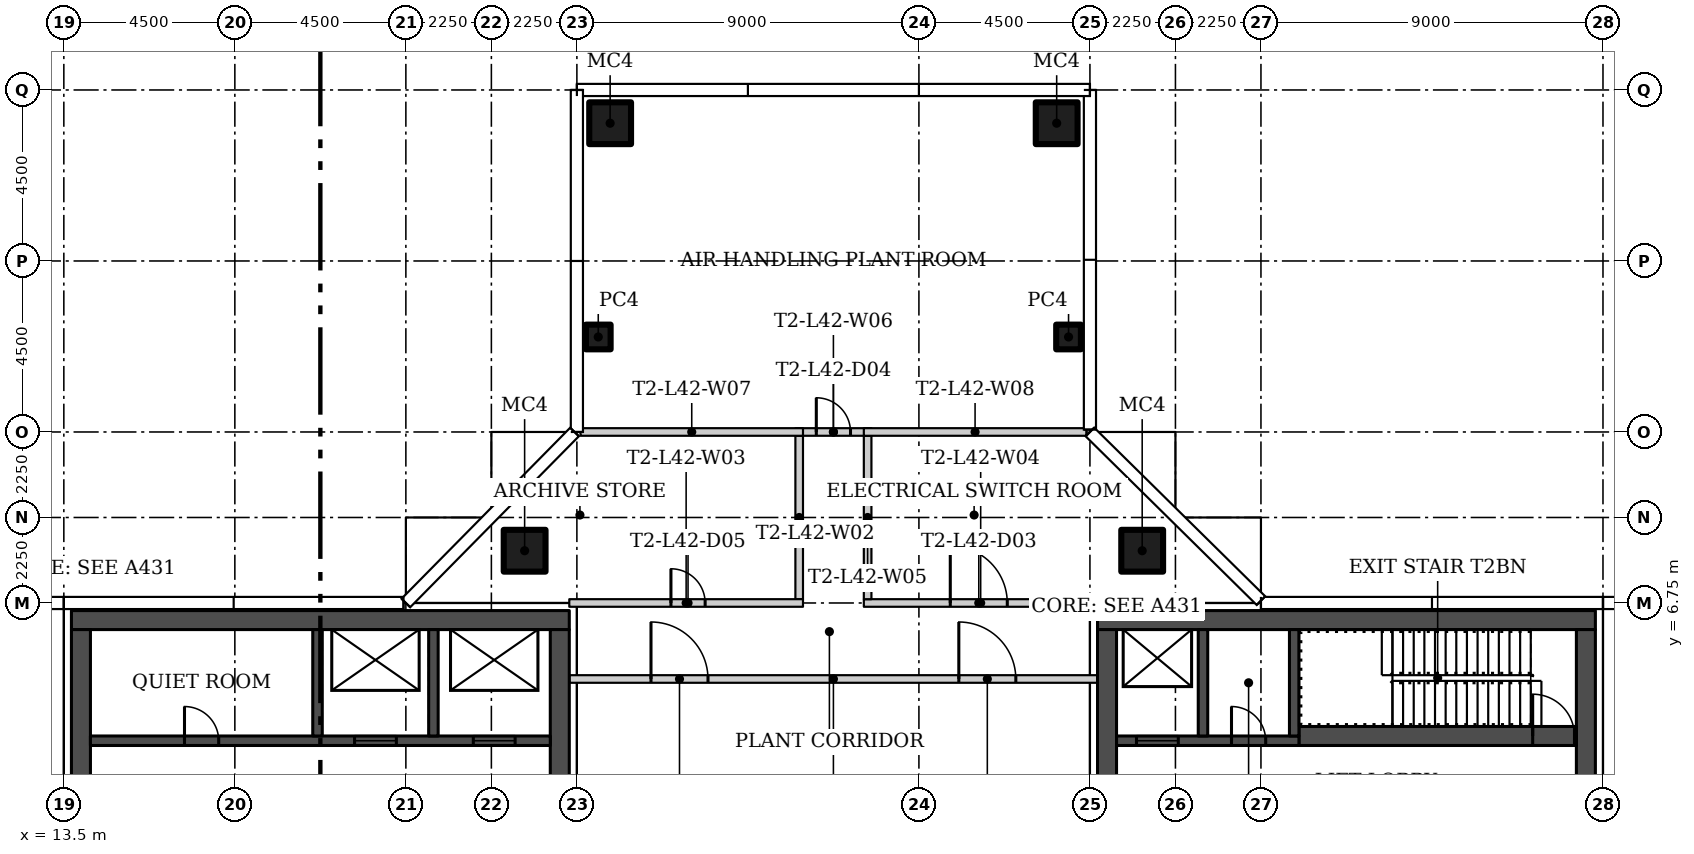
"""IFC4 building model, lengths in metres.
Left out: names, types, materials, properties, quantities, classifications, styles, units other than length and angle.
Written with IfcOpenShell. Run it as: python <this file> out.ifc"""

import sys

from ifc_helpers import new_model, si_unit, direction, frame, frame_2d, origin, origin_2d, place, context, subcontext, project, spatial, rectangle, hollow_rectangle, extrude, element, fill, save


model = new_model("IFC4")
c1 = context("Model", 3, precision=1e-05, world=origin(), true_north=direction((0.0, 1.0)))
c2 = subcontext(c1, "Body", "Model", "MODEL_VIEW")
j1 = project(units=[si_unit("LENGTHUNIT", "METRE"), si_unit("PLANEANGLEUNIT", "RADIAN")], contexts=[c1])
p1 = place(None, origin())
s1 = spatial("IfcSite", under=j1, at=p1, CompositionType="ELEMENT")
p2 = place(p1, origin())
s2 = spatial("IfcBuilding", under=s1, at=p2, CompositionType="ELEMENT")
p3 = place(p2, frame((0.0, 0.0, 177.9)))
s3 = spatial("IfcBuildingStorey", under=s2, at=p3, CompositionType="ELEMENT", Elevation=177.9)
for number, where in (
    (1, (25.625, 8.125, 0.0)),
    (2, (41.875, 8.125, 0.0)),
):
    element("IfcColumn", number, at=place(p3, frame(where)), inside=s3, PredefinedType="COLUMN", context=c2, shape_type="SweptSolid", body=[
        extrude(hollow_rectangle(XDim=1.1, YDim=1.1, WallThickness=0.04, at=origin_2d()), origin(), (0.0, 0.0, 1.0), 4.45),
    ])
p4 = place(p3, frame((39.938, 13.75, 0.0)))
e3 = element("IfcColumn", 3, at=p4, inside=s3, PredefinedType="COLUMN", context=c2, shape_type="SweptSolid", body=[
    extrude(hollow_rectangle(XDim=0.65, YDim=0.65, WallThickness=0.02, at=origin_2d()), origin(), (0.0, 0.0, 1.0), 4.45),
])
p5 = place(p3, frame((39.625, 19.375, 0.0)))
e4 = element("IfcColumn", 4, at=p5, inside=s3, PredefinedType="COLUMN", context=c2, shape_type="SweptSolid", body=[
    extrude(hollow_rectangle(XDim=1.1, YDim=1.1, WallThickness=0.04, at=origin_2d()), origin(), (0.0, 0.0, 1.0), 4.45),
])
p6 = place(p3, frame((27.562, 13.75, 0.0)))
e5 = element("IfcColumn", 5, at=p6, inside=s3, PredefinedType="COLUMN", context=c2, shape_type="SweptSolid", body=[
    extrude(hollow_rectangle(XDim=0.65, YDim=0.65, WallThickness=0.02, at=origin_2d()), origin(), (0.0, 0.0, 1.0), 4.45),
])
p7 = place(p3, frame((27.875, 19.375, 0.0)))
e6 = element("IfcColumn", 6, at=p7, inside=s3, PredefinedType="COLUMN", context=c2, shape_type="SweptSolid", body=[
    extrude(hollow_rectangle(XDim=1.1, YDim=1.1, WallThickness=0.04, at=origin_2d()), origin(), (0.0, 0.0, 1.0), 4.45),
])
p8 = place(p3, frame((26.8, 4.75, 0.0)))
e7 = element("IfcWall", 7, at=p8, inside=s3, PredefinedType="PARTITIONING", context=c2, shape_type="SweptSolid", body=[
    extrude(rectangle(XDim=13.9, YDim=0.2, at=frame_2d((6.95, 0.0))), origin(), (0.0, 0.0, 1.0), 4.45),
])
p9 = place(p8, frame((10.25, 0.0, 0.0)))
e8 = element("IfcOpeningElement", 8, at=p9, cuts=e7, PredefinedType="OPENING", context=c2, shape_type="SweptSolid", body=[
    extrude(rectangle(XDim=1.5, YDim=2.4, at=frame_2d((0.75, 1.2))), frame((0.0, 0.11, 0.0), z_axis=(0.0, -1.0, 0.0), x_axis=(1.0, 0.0, 0.0)), (0.0, 0.0, 1.0), 0.22),
])
p10 = place(p8, frame((2.15, 0.0, 0.0)))
e9 = element("IfcOpeningElement", 9, at=p10, cuts=e7, PredefinedType="OPENING", context=c2, shape_type="SweptSolid", body=[
    extrude(rectangle(XDim=1.5, YDim=2.4, at=frame_2d((0.75, 1.2))), frame((0.0, 0.11, 0.0), z_axis=(0.0, -1.0, 0.0), x_axis=(1.0, 0.0, 0.0)), (0.0, 0.0, 1.0), 0.22),
])
p11 = place(p3, frame((32.85, 6.85, 0.0), z_axis=(0.0, 0.0, 1.0), x_axis=(0.0, 1.0, 0.0)))
e10 = element("IfcWall", 10, at=p11, inside=s3, PredefinedType="PARTITIONING", context=c2, shape_type="SweptSolid", body=[
    extrude(rectangle(XDim=4.3, YDim=0.2, at=frame_2d((2.15, 0.0))), origin(), (0.0, 0.0, 1.0), 4.45),
])
p12 = place(p3, frame((26.8, 6.75, 0.0)))
e11 = element("IfcWall", 11, at=p12, inside=s3, PredefinedType="PARTITIONING", context=c2, shape_type="SweptSolid", body=[
    extrude(rectangle(XDim=6.15, YDim=0.2, at=frame_2d((3.075, 0.0))), origin(), (0.0, 0.0, 1.0), 4.45),
])
p13 = place(p12, frame((2.675, 0.0, 0.0)))
e12 = element("IfcOpeningElement", 12, at=p13, cuts=e11, PredefinedType="OPENING", context=c2, shape_type="SweptSolid", body=[
    extrude(rectangle(XDim=0.9, YDim=2.1, at=frame_2d((0.45, 1.05))), frame((0.0, 0.11, 0.0), z_axis=(0.0, -1.0, 0.0), x_axis=(1.0, 0.0, 0.0)), (0.0, 0.0, 1.0), 0.22),
])
p14 = place(p3, frame((34.55, 6.75, 0.0)))
e13 = element("IfcWall", 13, at=p14, inside=s3, PredefinedType="PARTITIONING", context=c2, shape_type="SweptSolid", body=[
    extrude(rectangle(XDim=6.15, YDim=0.2, at=frame_2d((3.075, 0.0))), origin(), (0.0, 0.0, 1.0), 4.45),
])
p15 = place(p14, frame((2.275, 0.0, 0.0)))
e14 = element("IfcOpeningElement", 14, at=p15, cuts=e13, PredefinedType="OPENING", context=c2, shape_type="SweptSolid", body=[
    extrude(rectangle(XDim=1.5, YDim=2.4, at=frame_2d((0.75, 1.2))), frame((0.0, 0.11, 0.0), z_axis=(0.0, -1.0, 0.0), x_axis=(1.0, 0.0, 0.0)), (0.0, 0.0, 1.0), 0.22),
])
p16 = place(p3, frame((34.65, 11.15, 0.0), z_axis=(0.0, 0.0, 1.0), x_axis=(0.0, -1.0, 0.0)))
e15 = element("IfcWall", 15, at=p16, inside=s3, PredefinedType="PARTITIONING", context=c2, shape_type="SweptSolid", body=[
    extrude(rectangle(XDim=4.3, YDim=0.2, at=frame_2d((2.15, 0.0))), origin(), (0.0, 0.0, 1.0), 4.45),
])
p17 = place(p3, frame((32.75, 11.25, 0.0)))
e16 = element("IfcWall", 16, at=p17, inside=s3, PredefinedType="PARTITIONING", context=c2, shape_type="SweptSolid", body=[
    extrude(rectangle(XDim=2.001, YDim=0.2, at=frame_2d((1.0, 0.0))), origin(), (0.0, 0.0, 1.0), 4.45),
])
p18 = place(p17, frame((0.55, 0.0, 0.0)))
e17 = element("IfcOpeningElement", 17, at=p18, cuts=e16, PredefinedType="OPENING", context=c2, shape_type="SweptSolid", body=[
    extrude(rectangle(XDim=0.9, YDim=2.4, at=frame_2d((0.45, 1.2))), frame((0.0, 0.11, 0.0), z_axis=(0.0, -1.0, 0.0), x_axis=(1.0, 0.0, 0.0)), (0.0, 0.0, 1.0), 0.22),
])
for number, where, z_axis, x_axis in (
    (18, (32.95, 11.25, 0.0), (0.0, 0.0, 1.0), (-1.0, 0.0, 0.0)),
    (19, (40.405, 11.25, 0.0), (0.0, 0.0, 1.0), (-1.0, 0.0, 0.0)),
):
    element("IfcWall", number, at=place(p3, frame(where, z_axis=z_axis, x_axis=x_axis)), inside=s3, PredefinedType="PARTITIONING", context=c2, shape_type="SweptSolid", body=[
        extrude(rectangle(XDim=5.855, YDim=0.2, at=frame_2d((2.927, 0.0))), origin(), (0.0, 0.0, 1.0), 4.45),
    ])
p19 = place(p3, frame((13.7, 6.3, 0.0)))
e20 = element("IfcWall", 20, at=p19, inside=s3, PredefinedType="SHEAR", context=c2, shape_type="SweptSolid", body=[
    extrude(rectangle(XDim=13.1, YDim=0.5, at=frame_2d((6.55, 0.0))), origin(), (0.0, 0.0, 1.0), 4.45),
])
p20 = place(p3, frame((13.95, 6.05, 0.0), z_axis=(0.0, 0.0, 1.0), x_axis=(0.0, -1.0, 0.0)))
e21 = element("IfcWall", 21, at=p20, inside=s3, PredefinedType="SHEAR", context=c2, shape_type="SweptSolid", body=[
    extrude(rectangle(XDim=12.1, YDim=0.5, at=frame_2d((6.05, 0.0))), origin(), (0.0, 0.0, 1.0), 4.45),
])
p21 = place(p20, frame((7.45, 0.0, 0.0)))
e22 = element("IfcOpeningElement", 22, at=p21, cuts=e21, PredefinedType="OPENING", context=c2, shape_type="SweptSolid", body=[
    extrude(rectangle(XDim=1.2, YDim=2.1, at=frame_2d((0.6, 1.05))), frame((0.0, 0.26, 0.0), z_axis=(0.0, -1.0, 0.0), x_axis=(1.0, 0.0, 0.0)), (0.0, 0.0, 1.0), 0.52),
])
p22 = place(p20, frame((3.9, 0.0, 0.0)))
e23 = element("IfcOpeningElement", 23, at=p22, cuts=e21, PredefinedType="OPENING", context=c2, shape_type="SweptSolid", body=[
    extrude(rectangle(XDim=1.8, YDim=2.4, at=frame_2d((0.9, 1.2))), frame((0.0, 0.26, 0.0), z_axis=(0.0, -1.0, 0.0), x_axis=(1.0, 0.0, 0.0)), (0.0, 0.0, 1.0), 0.52),
])
p23 = place(p3, frame((26.55, 6.05, 0.0), z_axis=(0.0, 0.0, 1.0), x_axis=(0.0, -1.0, 0.0)))
e24 = element("IfcWall", 24, at=p23, inside=s3, PredefinedType="SHEAR", context=c2, shape_type="SweptSolid", body=[
    extrude(rectangle(XDim=12.1, YDim=0.5, at=frame_2d((6.05, 0.0))), origin(), (0.0, 0.0, 1.0), 4.45),
])
p24 = place(p23, frame((10.1, 0.0, 0.0)))
e25 = element("IfcOpeningElement", 25, at=p24, cuts=e24, PredefinedType="OPENING", context=c2, shape_type="SweptSolid", body=[
    extrude(rectangle(XDim=1.2, YDim=2.1, at=frame_2d((0.6, 1.05))), frame((0.0, 0.26, 0.0), z_axis=(0.0, -1.0, 0.0), x_axis=(1.0, 0.0, 0.0)), (0.0, 0.0, 1.0), 0.52),
])
p25 = place(p23, frame((3.9, 0.0, 0.0)))
e26 = element("IfcOpeningElement", 26, at=p25, cuts=e24, PredefinedType="OPENING", context=c2, shape_type="SweptSolid", body=[
    extrude(rectangle(XDim=1.8, YDim=2.4, at=frame_2d((0.9, 1.2))), frame((0.0, 0.26, 0.0), z_axis=(0.0, -1.0, 0.0), x_axis=(1.0, 0.0, 0.0)), (0.0, 0.0, 1.0), 0.52),
])
p26 = place(p3, frame((14.2, 3.125, 0.0)))
e27 = element("IfcWall", 27, at=p26, inside=s3, PredefinedType="SHEAR", context=c2, shape_type="SweptSolid", body=[
    extrude(rectangle(XDim=12.1, YDim=0.25, at=frame_2d((6.05, 0.0))), origin(), (0.0, 0.0, 1.0), 4.45),
])
p27 = place(p26, frame((6.95, 0.0, 0.0)))
e28 = element("IfcOpeningElement", 28, at=p27, cuts=e27, PredefinedType="OPENING", context=c2, shape_type="SweptSolid", body=[
    extrude(rectangle(XDim=1.1, YDim=2.1, at=frame_2d((0.55, 1.05))), frame((0.0, 0.135, 0.0), z_axis=(0.0, -1.0, 0.0), x_axis=(1.0, 0.0, 0.0)), (0.0, 0.0, 1.0), 0.27),
])
p28 = place(p26, frame((10.075, 0.0, 0.0)))
e29 = element("IfcOpeningElement", 29, at=p28, cuts=e27, PredefinedType="OPENING", context=c2, shape_type="SweptSolid", body=[
    extrude(rectangle(XDim=1.1, YDim=2.1, at=frame_2d((0.55, 1.05))), frame((0.0, 0.135, 0.0), z_axis=(0.0, -1.0, 0.0), x_axis=(1.0, 0.0, 0.0)), (0.0, 0.0, 1.0), 0.27),
])
p29 = place(p26, frame((2.475, 0.0, 0.0)))
e30 = element("IfcOpeningElement", 30, at=p29, cuts=e27, PredefinedType="OPENING", context=c2, shape_type="SweptSolid", body=[
    extrude(rectangle(XDim=0.9, YDim=2.1, at=frame_2d((0.45, 1.05))), frame((0.0, 0.135, 0.0), z_axis=(0.0, -1.0, 0.0), x_axis=(1.0, 0.0, 0.0)), (0.0, 0.0, 1.0), 0.27),
])
for number, where, z_axis, x_axis in (
    (31, (20.175, 3.25, 0.0), (0.0, 0.0, 1.0), (0.0, 1.0, 0.0)),
    (32, (23.225, 3.25, 0.0), (0.0, 0.0, 1.0), (0.0, 1.0, 0.0)),
):
    element("IfcWall", number, at=place(p3, frame(where, z_axis=z_axis, x_axis=x_axis)), inside=s3, PredefinedType="SHEAR", context=c2, shape_type="SweptSolid", body=[
        extrude(rectangle(XDim=2.8, YDim=0.25, at=frame_2d((1.4, 0.0))), origin(), (0.0, 0.0, 1.0), 4.45),
    ])
p30 = place(p3, frame((53.8, 6.3, 0.0), z_axis=(0.0, 0.0, 1.0), x_axis=(-1.0, 0.0, 0.0)))
e33 = element("IfcWall", 33, at=p30, inside=s3, PredefinedType="SHEAR", context=c2, shape_type="SweptSolid", body=[
    extrude(rectangle(XDim=13.1, YDim=0.5, at=frame_2d((6.55, 0.0))), origin(), (0.0, 0.0, 1.0), 4.45),
])
p31 = place(p3, frame((53.55, -6.05, 0.0), z_axis=(0.0, 0.0, 1.0), x_axis=(0.0, 1.0, 0.0)))
e34 = element("IfcWall", 34, at=p31, inside=s3, PredefinedType="SHEAR", context=c2, shape_type="SweptSolid", body=[
    extrude(rectangle(XDim=12.1, YDim=0.5, at=frame_2d((6.05, 0.0))), origin(), (0.0, 0.0, 1.0), 4.45),
])
p32 = place(p31, frame((3.45, 0.0, 0.0)))
e35 = element("IfcOpeningElement", 35, at=p32, cuts=e34, PredefinedType="OPENING", context=c2, shape_type="SweptSolid", body=[
    extrude(rectangle(XDim=1.2, YDim=2.1, at=frame_2d((0.6, 1.05))), frame((0.0, 0.26, 0.0), z_axis=(0.0, -1.0, 0.0), x_axis=(1.0, 0.0, 0.0)), (0.0, 0.0, 1.0), 0.52),
])
p33 = place(p31, frame((6.4, 0.0, 0.0)))
e36 = element("IfcOpeningElement", 36, at=p33, cuts=e34, PredefinedType="OPENING", context=c2, shape_type="SweptSolid", body=[
    extrude(rectangle(XDim=1.8, YDim=2.4, at=frame_2d((0.9, 1.2))), frame((0.0, 0.26, 0.0), z_axis=(0.0, -1.0, 0.0), x_axis=(1.0, 0.0, 0.0)), (0.0, 0.0, 1.0), 0.52),
])
p34 = place(p3, frame((40.95, -6.05, 0.0), z_axis=(0.0, 0.0, 1.0), x_axis=(0.0, 1.0, 0.0)))
e37 = element("IfcWall", 37, at=p34, inside=s3, PredefinedType="SHEAR", context=c2, shape_type="SweptSolid", body=[
    extrude(rectangle(XDim=12.1, YDim=0.5, at=frame_2d((6.05, 0.0))), origin(), (0.0, 0.0, 1.0), 4.45),
])
p35 = place(p34, frame((0.8, 0.0, 0.0)))
e38 = element("IfcOpeningElement", 38, at=p35, cuts=e37, PredefinedType="OPENING", context=c2, shape_type="SweptSolid", body=[
    extrude(rectangle(XDim=1.2, YDim=2.1, at=frame_2d((0.6, 1.05))), frame((0.0, 0.26, 0.0), z_axis=(0.0, -1.0, 0.0), x_axis=(1.0, 0.0, 0.0)), (0.0, 0.0, 1.0), 0.52),
])
p36 = place(p34, frame((6.4, 0.0, 0.0)))
e39 = element("IfcOpeningElement", 39, at=p36, cuts=e37, PredefinedType="OPENING", context=c2, shape_type="SweptSolid", body=[
    extrude(rectangle(XDim=1.8, YDim=2.4, at=frame_2d((0.9, 1.2))), frame((0.0, 0.26, 0.0), z_axis=(0.0, -1.0, 0.0), x_axis=(1.0, 0.0, 0.0)), (0.0, 0.0, 1.0), 0.52),
])
p37 = place(p3, frame((46.0, 3.25, 0.0)))
e40 = element("IfcWall", 40, at=p37, inside=s3, PredefinedType="SHEAR", context=c2, shape_type="SweptSolid", body=[
    extrude(rectangle(XDim=7.3, YDim=0.5, at=frame_2d((3.65, 0.0))), origin(), (0.0, 0.0, 1.0), 4.45),
])
p38 = place(p37, frame((6.15, 0.0, 0.0)))
e41 = element("IfcOpeningElement", 41, at=p38, cuts=e40, PredefinedType="OPENING", context=c2, shape_type="SweptSolid", body=[
    extrude(rectangle(XDim=1.1, YDim=2.1, at=frame_2d((0.55, 1.05))), frame((0.0, 0.26, 0.0), z_axis=(0.0, -1.0, 0.0), x_axis=(1.0, 0.0, 0.0)), (0.0, 0.0, 1.0), 0.52),
])
p39 = place(p3, frame((41.2, 3.125, 0.0)))
e42 = element("IfcWall", 42, at=p39, inside=s3, PredefinedType="SHEAR", context=c2, shape_type="SweptSolid", body=[
    extrude(rectangle(XDim=4.8, YDim=0.25, at=frame_2d((2.4, 0.0))), origin(), (0.0, 0.0, 1.0), 4.45),
])
p40 = place(p39, frame((0.525, 0.0, 0.0)))
e43 = element("IfcOpeningElement", 43, at=p40, cuts=e42, PredefinedType="OPENING", context=c2, shape_type="SweptSolid", body=[
    extrude(rectangle(XDim=1.1, YDim=2.1, at=frame_2d((0.55, 1.05))), frame((0.0, 0.135, 0.0), z_axis=(0.0, -1.0, 0.0), x_axis=(1.0, 0.0, 0.0)), (0.0, 0.0, 1.0), 0.27),
])
p41 = place(p39, frame((3.025, 0.0, 0.0)))
e44 = element("IfcOpeningElement", 44, at=p41, cuts=e42, PredefinedType="OPENING", context=c2, shape_type="SweptSolid", body=[
    extrude(rectangle(XDim=0.9, YDim=2.1, at=frame_2d((0.45, 1.05))), frame((0.0, 0.135, 0.0), z_axis=(0.0, -1.0, 0.0), x_axis=(1.0, 0.0, 0.0)), (0.0, 0.0, 1.0), 0.27),
])
for number, where, z_axis, x_axis in (
    (45, (45.875, 3.25, 0.0), (0.0, 0.0, 1.0), (0.0, 1.0, 0.0)),
    (46, (43.475, 3.25, 0.0), (0.0, 0.0, 1.0), (0.0, 1.0, 0.0)),
):
    element("IfcWall", number, at=place(p3, frame(where, z_axis=z_axis, x_axis=x_axis)), inside=s3, PredefinedType="SHEAR", context=c2, shape_type="SweptSolid", body=[
        extrude(rectangle(XDim=2.8, YDim=0.25, at=frame_2d((1.4, 0.0))), origin(), (0.0, 0.0, 1.0), 4.45),
    ])
p42 = place(p9, origin())
e47 = element("IfcDoor", 47, at=p42, inside=s3, OperationType="DOUBLE_DOOR_SINGLE_SWING", PredefinedType="DOOR", context=c2, shape_type="SweptSolid", body=[
    extrude(rectangle(XDim=1.5, YDim=2.4, at=frame_2d((0.75, 1.2))), frame((0.0, 0.025, 0.0), z_axis=(0.0, -1.0, 0.0), x_axis=(1.0, 0.0, 0.0)), (0.0, 0.0, 1.0), 0.05),
])
fill(e8, e47)
p43 = place(p10, origin())
e48 = element("IfcDoor", 48, at=p43, inside=s3, OperationType="DOUBLE_DOOR_SINGLE_SWING", PredefinedType="DOOR", context=c2, shape_type="SweptSolid", body=[
    extrude(rectangle(XDim=1.5, YDim=2.4, at=frame_2d((0.75, 1.2))), frame((0.0, 0.025, 0.0), z_axis=(0.0, -1.0, 0.0), x_axis=(1.0, 0.0, 0.0)), (0.0, 0.0, 1.0), 0.05),
])
fill(e9, e48)
p44 = place(p15, origin())
e49 = element("IfcDoor", 49, at=p44, inside=s3, OperationType="DOUBLE_DOOR_SINGLE_SWING", PredefinedType="DOOR", context=c2, shape_type="SweptSolid", body=[
    extrude(rectangle(XDim=1.5, YDim=2.4, at=frame_2d((0.75, 1.2))), frame((0.0, 0.025, 0.0), z_axis=(0.0, -1.0, 0.0), x_axis=(1.0, 0.0, 0.0)), (0.0, 0.0, 1.0), 0.05),
])
fill(e14, e49)
p45 = place(p18, origin())
e50 = element("IfcDoor", 50, at=p45, inside=s3, OperationType="SINGLE_SWING_RIGHT", PredefinedType="DOOR", context=c2, shape_type="SweptSolid", body=[
    extrude(rectangle(XDim=0.9, YDim=2.4, at=frame_2d((0.45, 1.2))), frame((0.0, 0.025, 0.0), z_axis=(0.0, -1.0, 0.0), x_axis=(1.0, 0.0, 0.0)), (0.0, 0.0, 1.0), 0.05),
])
fill(e17, e50)
p46 = place(p13, origin())
e51 = element("IfcDoor", 51, at=p46, inside=s3, OperationType="SINGLE_SWING_LEFT", PredefinedType="DOOR", context=c2, shape_type="SweptSolid", body=[
    extrude(rectangle(XDim=0.9, YDim=2.1, at=frame_2d((0.45, 1.05))), frame((0.0, 0.025, 0.0), z_axis=(0.0, -1.0, 0.0), x_axis=(1.0, 0.0, 0.0)), (0.0, 0.0, 1.0), 0.05),
])
fill(e12, e51)
p47 = place(p27, origin())
e52 = element("IfcDoor", 52, at=p47, inside=s3, OperationType="SLIDING_TO_LEFT", PredefinedType="DOOR", context=c2, shape_type="SweptSolid", body=[
    extrude(rectangle(XDim=1.1, YDim=2.1, at=frame_2d((0.55, 1.05))), frame((0.0, 0.025, 0.0), z_axis=(0.0, -1.0, 0.0), x_axis=(1.0, 0.0, 0.0)), (0.0, 0.0, 1.0), 0.05),
])
fill(e28, e52)
p48 = place(p28, origin())
e53 = element("IfcDoor", 53, at=p48, inside=s3, OperationType="SLIDING_TO_LEFT", PredefinedType="DOOR", context=c2, shape_type="SweptSolid", body=[
    extrude(rectangle(XDim=1.1, YDim=2.1, at=frame_2d((0.55, 1.05))), frame((0.0, 0.025, 0.0), z_axis=(0.0, -1.0, 0.0), x_axis=(1.0, 0.0, 0.0)), (0.0, 0.0, 1.0), 0.05),
])
fill(e29, e53)
p49 = place(p29, origin())
e54 = element("IfcDoor", 54, at=p49, inside=s3, OperationType="SINGLE_SWING_LEFT", PredefinedType="DOOR", context=c2, shape_type="SweptSolid", body=[
    extrude(rectangle(XDim=0.9, YDim=2.1, at=frame_2d((0.45, 1.05))), frame((0.0, 0.025, 0.0), z_axis=(0.0, -1.0, 0.0), x_axis=(1.0, 0.0, 0.0)), (0.0, 0.0, 1.0), 0.05),
])
fill(e30, e54)
p50 = place(p38, origin())
e55 = element("IfcDoor", 55, at=p50, inside=s3, OperationType="SINGLE_SWING_RIGHT", PredefinedType="DOOR", context=c2, shape_type="SweptSolid", body=[
    extrude(rectangle(XDim=1.1, YDim=2.1, at=frame_2d((0.55, 1.05))), frame((0.0, 0.025, 0.0), z_axis=(0.0, -1.0, 0.0), x_axis=(1.0, 0.0, 0.0)), (0.0, 0.0, 1.0), 0.05),
])
fill(e41, e55)
p51 = place(p40, origin())
e56 = element("IfcDoor", 56, at=p51, inside=s3, OperationType="SLIDING_TO_LEFT", PredefinedType="DOOR", context=c2, shape_type="SweptSolid", body=[
    extrude(rectangle(XDim=1.1, YDim=2.1, at=frame_2d((0.55, 1.05))), frame((0.0, 0.025, 0.0), z_axis=(0.0, -1.0, 0.0), x_axis=(1.0, 0.0, 0.0)), (0.0, 0.0, 1.0), 0.05),
])
fill(e43, e56)
p52 = place(p41, origin())
e57 = element("IfcDoor", 57, at=p52, inside=s3, OperationType="SINGLE_SWING_RIGHT", PredefinedType="DOOR", context=c2, shape_type="SweptSolid", body=[
    extrude(rectangle(XDim=0.9, YDim=2.1, at=frame_2d((0.45, 1.05))), frame((0.0, 0.025, 0.0), z_axis=(0.0, -1.0, 0.0), x_axis=(1.0, 0.0, 0.0)), (0.0, 0.0, 1.0), 0.05),
])
fill(e44, e57)
save(model, sys.argv[1])
